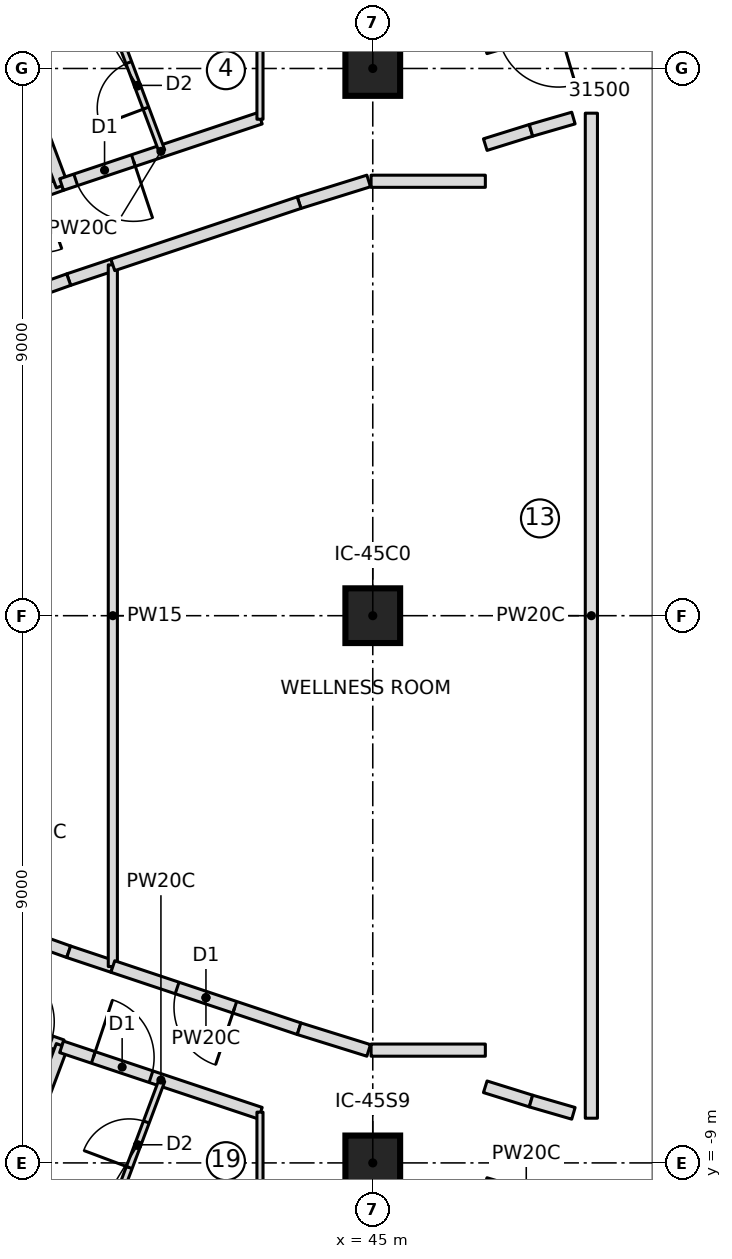
"""IFC4 building model, lengths in metres.
Left out: names, types, materials, properties, quantities, classifications, styles, units other than length and angle.
Written with IfcOpenShell. Run it as: python <this file> out.ifc"""

import sys

from ifc_helpers import new_model, si_unit, direction, frame, frame_2d, origin, origin_2d, place, context, subcontext, project, spatial, rectangle, extrude, element, fill, save


model = new_model("IFC4")
c1 = context("Model", 3, precision=1e-05, world=origin(), true_north=direction((0.0, 1.0)))
c2 = subcontext(c1, "Body", "Model", "MODEL_VIEW")
j1 = project(units=[si_unit("LENGTHUNIT", "METRE"), si_unit("PLANEANGLEUNIT", "RADIAN")], contexts=[c1])
p1 = place(None, origin())
s1 = spatial("IfcSite", under=j1, at=p1, CompositionType="ELEMENT")
p2 = place(p1, origin())
s2 = spatial("IfcBuilding", under=s1, at=p2, CompositionType="ELEMENT")
p3 = place(p2, frame((0.0, 0.0, 249.2)))
s3 = spatial("IfcBuildingStorey", under=s2, at=p3, CompositionType="ELEMENT", Elevation=249.2)
for number, where, z_axis, x_axis in (
    (1, (45.0, -9.0, 0.0), (0.0, 0.0, 1.0), (1.0, 0.0, 0.0)),
    (2, (45.0, 0.0, 0.0), (0.0, 0.0, 1.0), (1.0, 0.0, 0.0)),
    (3, (45.0, 9.0, 0.0), (0.0, 0.0, 1.0), (1.0, 0.0, 0.0)),
):
    element("IfcColumn", number, at=place(p3, frame(where, z_axis=z_axis, x_axis=x_axis)), inside=s3, PredefinedType="COLUMN", context=c2, shape_type="SweptSolid", body=[
        extrude(rectangle(XDim=0.9, YDim=0.9, at=origin_2d()), origin(), (0.0, 0.0, 1.0), 3.55),
    ])
p4 = place(p3, frame((39.882, 7.091, 0.0), z_axis=(0.0, 0.0, 1.0), x_axis=(-0.942537055217, -0.334101630559, 0.0)))
e4 = element("IfcWall", 4, at=p4, inside=s3, PredefinedType="PARTITIONING", context=c2, shape_type="SweptSolid", body=[
    extrude(rectangle(XDim=4.244, YDim=0.2, at=frame_2d((2.122, 0.0))), origin(), (0.0, 0.0, 1.0), 3.25),
])
p5 = place(p4, frame((0.35, 0.0, 0.0)))
e5 = element("IfcOpeningElement", 5, at=p5, cuts=e4, PredefinedType="OPENING", context=c2, shape_type="SweptSolid", body=[
    extrude(rectangle(XDim=1.0, YDim=2.1, at=frame_2d((0.5, 1.05))), frame((0.0, 0.11, 0.0), z_axis=(0.0, -1.0, 0.0), x_axis=(1.0, 0.0, 0.0)), (0.0, 0.0, 1.0), 0.22),
])
p6 = place(p3, frame((39.889, 7.072, 0.0), z_axis=(0.0, 0.0, 1.0), x_axis=(-0.35112895446, 0.936327110224, 0.0)))
e6 = element("IfcWall", 6, at=p6, inside=s3, PredefinedType="PARTITIONING", context=c2, shape_type="SweptSolid", body=[
    extrude(rectangle(XDim=9.706, YDim=0.2, at=frame_2d((4.853, 0.0))), origin(), (0.0, 0.0, 1.0), 3.25),
])
p7 = place(p3, frame((43.15, 8.183, 0.0), z_axis=(0.0, 0.0, 1.0), x_axis=(-0.948477584784, -0.316844238013, 0.0)))
e7 = element("IfcWall", 7, at=p7, inside=s3, PredefinedType="PARTITIONING", context=c2, shape_type="SweptSolid", body=[
    extrude(rectangle(XDim=3.445, YDim=0.2, at=frame_2d((1.723, 0.0))), origin(), (0.0, 0.0, 1.0), 3.25),
])
p8 = place(p7, frame((2.2, 0.0, 0.0)))
e8 = element("IfcOpeningElement", 8, at=p8, cuts=e7, PredefinedType="OPENING", context=c2, shape_type="SweptSolid", body=[
    extrude(rectangle(XDim=1.0, YDim=2.1, at=frame_2d((0.5, 1.05))), frame((0.0, 0.11, 0.0), z_axis=(0.0, -1.0, 0.0), x_axis=(1.0, 0.0, 0.0)), (0.0, 0.0, 1.0), 0.22),
])
p9 = place(p3, frame((41.532, 7.645, 0.0), z_axis=(0.0, 0.0, 1.0), x_axis=(-0.351146927505, 0.936320370014, 0.0)))
e9 = element("IfcWall", 9, at=p9, inside=s3, PredefinedType="PARTITIONING", context=c2, shape_type="SweptSolid", body=[
    extrude(rectangle(XDim=2.278, YDim=0.1, at=frame_2d((1.139, 0.0))), origin(), (0.0, 0.0, 1.0), 3.25),
])
p10 = place(p9, frame((0.75, 0.0, 0.0)))
e10 = element("IfcOpeningElement", 10, at=p10, cuts=e9, PredefinedType="OPENING", context=c2, shape_type="SweptSolid", body=[
    extrude(rectangle(XDim=0.8, YDim=2.1, at=frame_2d((0.4, 1.05))), frame((0.0, 0.06, 0.0), z_axis=(0.0, -1.0, 0.0), x_axis=(1.0, 0.0, 0.0)), (0.0, 0.0, 1.0), 0.12),
])
p11 = place(p3, frame((35.882, -5.673, 0.0), z_axis=(0.0, 0.0, 1.0), x_axis=(0.944107376821, -0.329638075823, 0.0)))
e11 = element("IfcWall", 11, at=p11, inside=s3, PredefinedType="PARTITIONING", context=c2, shape_type="SweptSolid", body=[
    extrude(rectangle(XDim=4.245, YDim=0.2, at=frame_2d((2.122, 0.0))), origin(), (0.0, 0.0, 1.0), 3.25),
])
p12 = place(p11, frame((3.05, 0.0, 0.0)))
e12 = element("IfcOpeningElement", 12, at=p12, cuts=e11, PredefinedType="OPENING", context=c2, shape_type="SweptSolid", body=[
    extrude(rectangle(XDim=1.0, YDim=2.1, at=frame_2d((0.5, 1.05))), frame((0.0, 0.11, 0.0), z_axis=(0.0, -1.0, 0.0), x_axis=(1.0, 0.0, 0.0)), (0.0, 0.0, 1.0), 0.22),
])
p13 = place(p3, frame((36.481, -16.161, 0.0), z_axis=(0.0, 0.0, 1.0), x_axis=(0.35112895446, 0.936327110224, 0.0)))
e13 = element("IfcWall", 13, at=p13, inside=s3, PredefinedType="PARTITIONING", context=c2, shape_type="SweptSolid", body=[
    extrude(rectangle(XDim=9.706, YDim=0.2, at=frame_2d((4.853, 0.0))), origin(), (0.0, 0.0, 1.0), 3.25),
])
p14 = place(p3, frame((39.882, -7.091, 0.0), z_axis=(0.0, 0.0, 1.0), x_axis=(0.948477584784, -0.316844238013, 0.0)))
e14 = element("IfcWall", 14, at=p14, inside=s3, PredefinedType="PARTITIONING", context=c2, shape_type="SweptSolid", body=[
    extrude(rectangle(XDim=3.445, YDim=0.2, at=frame_2d((1.723, 0.0))), origin(), (0.0, 0.0, 1.0), 3.25),
])
p15 = place(p14, frame((0.55, 0.0, 0.0)))
e15 = element("IfcOpeningElement", 15, at=p15, cuts=e14, PredefinedType="OPENING", context=c2, shape_type="SweptSolid", body=[
    extrude(rectangle(XDim=1.0, YDim=2.1, at=frame_2d((0.5, 1.05))), frame((0.0, 0.11, 0.0), z_axis=(0.0, -1.0, 0.0), x_axis=(1.0, 0.0, 0.0)), (0.0, 0.0, 1.0), 0.22),
])
p16 = place(p3, frame((40.732, -9.779, 0.0), z_axis=(0.0, 0.0, 1.0), x_axis=(0.351146927505, 0.936320370014, 0.0)))
e16 = element("IfcWall", 16, at=p16, inside=s3, PredefinedType="PARTITIONING", context=c2, shape_type="SweptSolid", body=[
    extrude(rectangle(XDim=2.278, YDim=0.1, at=frame_2d((1.139, 0.0))), origin(), (0.0, 0.0, 1.0), 3.25),
])
p17 = place(p16, frame((0.75, 0.0, 0.0)))
e17 = element("IfcOpeningElement", 17, at=p17, cuts=e16, PredefinedType="OPENING", context=c2, shape_type="SweptSolid", body=[
    extrude(rectangle(XDim=0.8, YDim=2.1, at=frame_2d((0.4, 1.05))), frame((0.0, 0.06, 0.0), z_axis=(0.0, -1.0, 0.0), x_axis=(1.0, 0.0, 0.0)), (0.0, 0.0, 1.0), 0.12),
])
p18 = place(p3, frame((46.85, -9.34, 0.0), z_axis=(0.0, 0.0, 1.0), x_axis=(0.958866391875, -0.283857785753, 0.0)))
e18 = element("IfcWall", 18, at=p18, inside=s3, PredefinedType="PARTITIONING", context=c2, shape_type="SweptSolid", body=[
    extrude(rectangle(XDim=1.406, YDim=0.2, at=frame_2d((0.703, 0.0))), origin(), (0.0, 0.0, 1.0), 3.25),
])
p19 = place(p3, frame((39.999, -5.527, 0.0), z_axis=(0.0, 0.0, 1.0), x_axis=(-0.941909090846, 0.335867927288, 0.0)))
e19 = element("IfcWall", 19, at=p19, inside=s3, PredefinedType="PARTITIONING", context=c2, shape_type="SweptSolid", body=[
    extrude(rectangle(XDim=3.995, YDim=0.2, at=frame_2d((1.998, 0.0))), origin(), (0.0, 0.0, 1.0), 3.25),
])
p20 = place(p19, frame((1.498, 0.0, 0.0)))
e20 = element("IfcOpeningElement", 20, at=p20, cuts=e19, PredefinedType="OPENING", context=c2, shape_type="SweptSolid", body=[
    extrude(rectangle(XDim=1.0, YDim=2.1, at=frame_2d((0.5, 1.05))), frame((0.0, 0.11, 0.0), z_axis=(0.0, -1.0, 0.0), x_axis=(1.0, 0.0, 0.0)), (0.0, 0.0, 1.0), 0.22),
])
for number, where, z_axis, x_axis in (
    (21, (39.999, 5.527, 0.0), (0.0, 0.0, 1.0), (0.948, 0.317, 0.0)),
    (22, (40.725, -5.77, 0.0), (0.0, 0.0, 1.0), (-0.948, 0.317, 0.0)),
):
    element("IfcWall", number, at=place(p3, frame(where, z_axis=z_axis, x_axis=x_axis)), inside=s3, PredefinedType="PARTITIONING", context=c2, shape_type="SweptSolid", body=[
        extrude(rectangle(XDim=0.765, YDim=0.2, at=frame_2d((0.383, 0.0))), origin(), (0.0, 0.0, 1.0), 3.25),
    ])
p21 = place(p3, frame((36.236, 4.186, 0.0), z_axis=(0.0, 0.0, 1.0), x_axis=(0.941909090846, 0.335867927288, 0.0)))
e23 = element("IfcWall", 23, at=p21, inside=s3, PredefinedType="PARTITIONING", context=c2, shape_type="SweptSolid", body=[
    extrude(rectangle(XDim=3.995, YDim=0.2, at=frame_2d((1.998, 0.0))), origin(), (0.0, 0.0, 1.0), 3.25),
])
p22 = place(p3, frame((40.725, -5.77, 0.0), z_axis=(0.0, 0.0, 1.0), x_axis=(0.0, 1.0, 0.0)))
e24 = element("IfcWall", 24, at=p22, inside=s3, PredefinedType="PARTITIONING", context=c2, shape_type="SweptSolid", body=[
    extrude(rectangle(XDim=11.54, YDim=0.15, at=frame_2d((5.77, 0.0))), origin(), (0.0, 0.0, 1.0), 3.25),
])
p23 = place(p3, frame((43.788, -6.793, 0.0), z_axis=(0.0, 0.0, 1.0), x_axis=(-0.948486568618, 0.316817343515, 0.0)))
e25 = element("IfcWall", 25, at=p23, inside=s3, PredefinedType="PARTITIONING", context=c2, shape_type="SweptSolid", body=[
    extrude(rectangle(XDim=3.229, YDim=0.2, at=frame_2d((1.615, 0.0))), origin(), (0.0, 0.0, 1.0), 3.25),
])
p24 = place(p23, frame((1.115, 0.0, 0.0)))
e26 = element("IfcOpeningElement", 26, at=p24, cuts=e25, PredefinedType="OPENING", context=c2, shape_type="SweptSolid", body=[
    extrude(rectangle(XDim=1.0, YDim=2.1, at=frame_2d((0.5, 1.05))), frame((0.0, 0.11, 0.0), z_axis=(0.0, -1.0, 0.0), x_axis=(1.0, 0.0, 0.0)), (0.0, 0.0, 1.0), 0.22),
])
p25 = place(p3, frame((43.788, 6.793, 0.0), z_axis=(0.0, 0.0, 1.0), x_axis=(0.954693570678, 0.29759063511, 0.0)))
e27 = element("IfcWall", 27, at=p25, inside=s3, PredefinedType="PARTITIONING", context=c2, shape_type="SweptSolid", body=[
    extrude(rectangle(XDim=1.198, YDim=0.2, at=frame_2d((0.599, 0.0))), origin(), (0.0, 0.0, 1.0), 3.25),
])
for number, where, z_axis, x_axis in (
    (28, (46.85, 7.748, 0.0), (0.0, 0.0, 1.0), (0.955, 0.298, 0.0)),
    (29, (47.602, -7.982, 0.0), (0.0, 0.0, 1.0), (-0.955, 0.298, 0.0)),
):
    element("IfcWall", number, at=place(p3, frame(where, z_axis=z_axis, x_axis=x_axis)), inside=s3, PredefinedType="PARTITIONING", context=c2, shape_type="SweptSolid", body=[
        extrude(rectangle(XDim=0.788, YDim=0.2, at=frame_2d((0.394, 0.0))), origin(), (0.0, 0.0, 1.0), 3.25),
    ])
p26 = place(p3, frame((44.933, -7.15, 0.0), z_axis=(0.0, 0.0, 1.0), x_axis=(-0.954693570678, 0.29759063511, 0.0)))
e30 = element("IfcWall", 30, at=p26, inside=s3, PredefinedType="PARTITIONING", context=c2, shape_type="SweptSolid", body=[
    extrude(rectangle(XDim=1.198, YDim=0.2, at=frame_2d((0.599, 0.0))), origin(), (0.0, 0.0, 1.0), 3.25),
])
p27 = place(p3, frame((40.725, 5.77, 0.0), z_axis=(0.0, 0.0, 1.0), x_axis=(0.948486568618, 0.316817343515, 0.0)))
e31 = element("IfcWall", 31, at=p27, inside=s3, PredefinedType="PARTITIONING", context=c2, shape_type="SweptSolid", body=[
    extrude(rectangle(XDim=3.229, YDim=0.2, at=frame_2d((1.615, 0.0))), origin(), (0.0, 0.0, 1.0), 3.25),
])
for number, where, z_axis, x_axis in (
    (32, (43.145, 10.463, 0.0), (0.0, 0.0, 1.0), (0.0, -1.0, 0.0)),
    (33, (43.145, -8.165, 0.0), (0.0, 0.0, 1.0), (0.0, -1.0, 0.0)),
):
    element("IfcWall", number, at=place(p3, frame(where, z_axis=z_axis, x_axis=x_axis)), inside=s3, PredefinedType="PARTITIONING", context=c2, shape_type="SweptSolid", body=[
        extrude(rectangle(XDim=2.298, YDim=0.1, at=frame_2d((1.149, 0.0))), origin(), (0.0, 0.0, 1.0), 3.25),
    ])
p28 = place(p3, frame((48.3, 9.766, 0.0), z_axis=(0.0, 0.0, 1.0), x_axis=(-0.95944263903, -0.281903924079, 0.0)))
e34 = element("IfcWall", 34, at=p28, inside=s3, PredefinedType="PARTITIONING", context=c2, shape_type="SweptSolid", body=[
    extrude(rectangle(XDim=1.511, YDim=0.2, at=frame_2d((0.756, 0.0))), origin(), (0.0, 0.0, 1.0), 3.25),
])
p29 = place(p28, frame((0.256, 0.0, 0.0)))
e35 = element("IfcOpeningElement", 35, at=p29, cuts=e34, PredefinedType="OPENING", context=c2, shape_type="SweptSolid", body=[
    extrude(rectangle(XDim=1.0, YDim=2.1, at=frame_2d((0.5, 1.05))), frame((0.0, 0.11, 0.0), z_axis=(0.0, -1.0, 0.0), x_axis=(1.0, 0.0, 0.0)), (0.0, 0.0, 1.0), 0.22),
])
for number, where, z_axis, x_axis in (
    (36, (47.602, 7.982, 0.0), (0.0, 0.0, 1.0), (0.96, 0.278, 0.0)),
    (37, (48.3, -8.185, 0.0), (0.0, 0.0, 1.0), (-0.96, 0.278, 0.0)),
):
    element("IfcWall", number, at=place(p3, frame(where, z_axis=z_axis, x_axis=x_axis)), inside=s3, PredefinedType="PARTITIONING", context=c2, shape_type="SweptSolid", body=[
        extrude(rectangle(XDim=0.727, YDim=0.2, at=frame_2d((0.363, 0.0))), origin(), (0.0, 0.0, 1.0), 3.25),
    ])
p30 = place(p3, frame((44.972, 7.145, 0.0), z_axis=(0.0, 0.0, 1.0), x_axis=(0.99999999156, 0.000129920747, 0.0)))
e38 = element("IfcWall", 38, at=p30, inside=s3, PredefinedType="PARTITIONING", context=c2, shape_type="SweptSolid", body=[
    extrude(rectangle(XDim=1.879, YDim=0.2, at=frame_2d((0.939, 0.0))), origin(), (0.0, 0.0, 1.0), 3.25),
])
p31 = place(p3, frame((48.595, 8.265, 0.0), z_axis=(0.0, 0.0, 1.0), x_axis=(0.0, -1.0, 0.0)))
e39 = element("IfcWall", 39, at=p31, inside=s3, PredefinedType="PARTITIONING", context=c2, shape_type="SweptSolid", body=[
    extrude(rectangle(XDim=16.53, YDim=0.2, at=frame_2d((8.265, 0.0))), origin(), (0.0, 0.0, 1.0), 3.25),
])
p32 = place(p3, frame((46.852, -7.145, 0.0), z_axis=(0.0, 0.0, 1.0), x_axis=(-0.99999999156, 0.000129920747, 0.0)))
e40 = element("IfcWall", 40, at=p32, inside=s3, PredefinedType="PARTITIONING", context=c2, shape_type="SweptSolid", body=[
    extrude(rectangle(XDim=1.879, YDim=0.2, at=frame_2d((0.939, 0.0))), origin(), (0.0, 0.0, 1.0), 3.25),
])
p33 = place(p10, origin())
e41 = element("IfcDoor", 41, at=p33, inside=s3, OperationType="SINGLE_SWING_LEFT", PredefinedType="DOOR", context=c2, shape_type="SweptSolid", body=[
    extrude(rectangle(XDim=0.8, YDim=2.1, at=frame_2d((0.4, 1.05))), frame((0.0, 0.025, 0.0), z_axis=(0.0, -1.0, 0.0), x_axis=(1.0, 0.0, 0.0)), (0.0, 0.0, 1.0), 0.05),
])
fill(e10, e41)
p34 = place(p8, origin())
e42 = element("IfcDoor", 42, at=p34, inside=s3, OperationType="SINGLE_SWING_LEFT", PredefinedType="DOOR", context=c2, shape_type="SweptSolid", body=[
    extrude(rectangle(XDim=1.0, YDim=2.1, at=frame_2d((0.5, 1.05))), frame((0.0, 0.025, 0.0), z_axis=(0.0, -1.0, 0.0), x_axis=(1.0, 0.0, 0.0)), (0.0, 0.0, 1.0), 0.05),
])
fill(e8, e42)
p35 = place(p17, origin())
e43 = element("IfcDoor", 43, at=p35, inside=s3, OperationType="SINGLE_SWING_LEFT", PredefinedType="DOOR", context=c2, shape_type="SweptSolid", body=[
    extrude(rectangle(XDim=0.8, YDim=2.1, at=frame_2d((0.4, 1.05))), frame((0.0, 0.025, 0.0), z_axis=(0.0, -1.0, 0.0), x_axis=(1.0, 0.0, 0.0)), (0.0, 0.0, 1.0), 0.05),
])
fill(e17, e43)
p36 = place(p15, origin())
e44 = element("IfcDoor", 44, at=p36, inside=s3, OperationType="SINGLE_SWING_LEFT", PredefinedType="DOOR", context=c2, shape_type="SweptSolid", body=[
    extrude(rectangle(XDim=1.0, YDim=2.1, at=frame_2d((0.5, 1.05))), frame((0.0, 0.025, 0.0), z_axis=(0.0, -1.0, 0.0), x_axis=(1.0, 0.0, 0.0)), (0.0, 0.0, 1.0), 0.05),
])
fill(e15, e44)
p37 = place(p24, origin())
e45 = element("IfcDoor", 45, at=p37, inside=s3, OperationType="SINGLE_SWING_LEFT", PredefinedType="DOOR", context=c2, shape_type="SweptSolid", body=[
    extrude(rectangle(XDim=1.0, YDim=2.1, at=frame_2d((0.5, 1.05))), frame((0.0, 0.025, 0.0), z_axis=(0.0, -1.0, 0.0), x_axis=(1.0, 0.0, 0.0)), (0.0, 0.0, 1.0), 0.05),
])
fill(e26, e45)
save(model, sys.argv[1])
